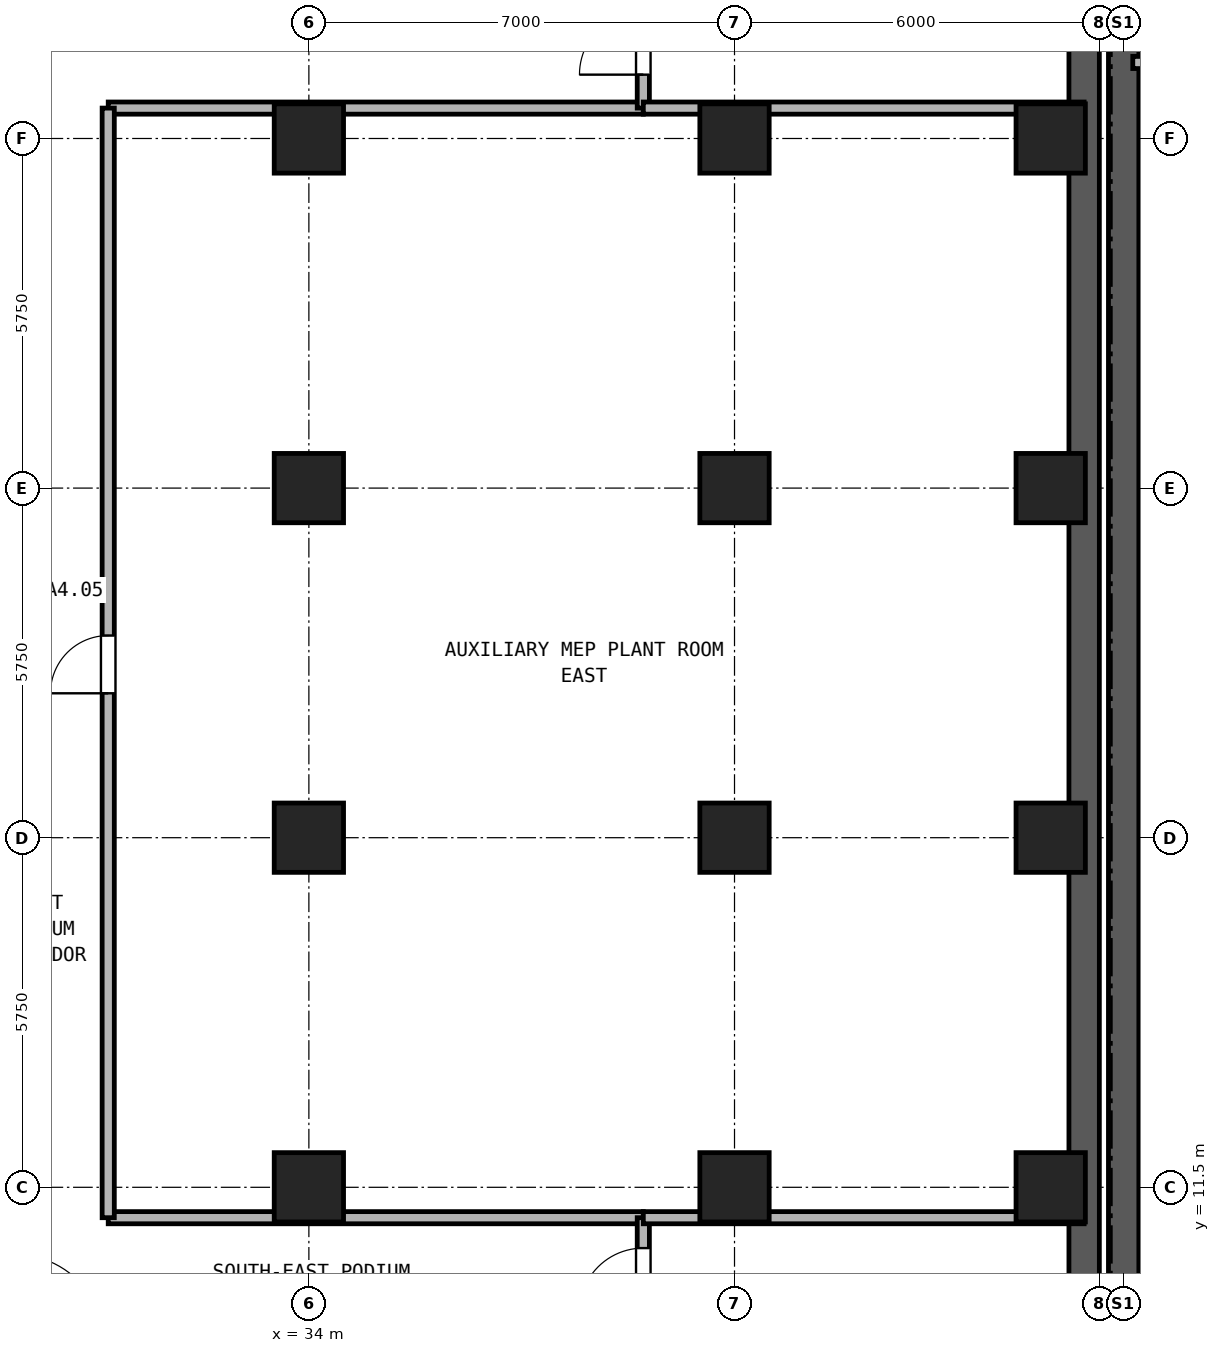
"""IFC4 building model, lengths in metres.
Left out: names, types, materials, properties, quantities, classifications, styles, units other than length and angle.
Written with IfcOpenShell. Run it as: python <this file> out.ifc"""

import sys

from ifc_helpers import new_model, si_unit, direction, frame, frame_2d, origin, origin_2d, place, context, subcontext, project, spatial, rectangle, hollow_rectangle, extrude, source, transform, mapped, element, fill, save


model = new_model("IFC4")
c1 = context("Model", 3, precision=1e-05, world=origin(), true_north=direction((0.0, 1.0)))
c2 = subcontext(c1, "Body", "Model", "MODEL_VIEW")
j1 = project(units=[si_unit("LENGTHUNIT", "METRE"), si_unit("PLANEANGLEUNIT", "RADIAN")], contexts=[c1])
p1 = place(None, origin())
s1 = spatial("IfcSite", under=j1, at=p1, CompositionType="ELEMENT")
p2 = place(p1, origin())
s2 = spatial("IfcBuilding", under=s1, at=p2, CompositionType="ELEMENT")
p3 = place(p2, frame((0.0, 0.0, -4.2)))
s3 = spatial("IfcBuildingStorey", under=s2, at=p3, CompositionType="ELEMENT", Elevation=-4.2)
m1 = source(origin(), c2, "Body", "SweptSolid", [
    extrude(hollow_rectangle(XDim=1.14, YDim=1.14, WallThickness=0.07, at=origin_2d()), origin(), (0.0, 0.0, 1.0), 3.88),
])
for number, where, z_axis, x_axis in (
    (1, (46.2, 11.5, 0.0), (0.0, 0.0, 1.0), (1.0, 0.0, 0.0)),
    (2, (46.2, 17.25, 0.0), (0.0, 0.0, 1.0), (1.0, 0.0, 0.0)),
    (3, (46.2, 23.0, 0.0), (0.0, 0.0, 1.0), (1.0, 0.0, 0.0)),
    (4, (46.2, 28.75, 0.0), (0.0, 0.0, 1.0), (1.0, 0.0, 0.0)),
    (5, (34.0, 11.5, 0.0), (0.0, 0.0, 1.0), (1.0, 0.0, 0.0)),
    (6, (34.0, 17.25, 0.0), (0.0, 0.0, 1.0), (1.0, 0.0, 0.0)),
    (7, (34.0, 23.0, 0.0), (0.0, 0.0, 1.0), (1.0, 0.0, 0.0)),
    (8, (34.0, 28.75, 0.0), (0.0, 0.0, 1.0), (1.0, 0.0, 0.0)),
    (9, (41.0, 11.5, 0.0), (0.0, 0.0, 1.0), (1.0, 0.0, 0.0)),
    (10, (41.0, 17.25, 0.0), (0.0, 0.0, 1.0), (1.0, 0.0, 0.0)),
    (11, (41.0, 23.0, 0.0), (0.0, 0.0, 1.0), (1.0, 0.0, 0.0)),
    (12, (41.0, 28.75, 0.0), (0.0, 0.0, 1.0), (1.0, 0.0, 0.0)),
):
    element("IfcColumn", number, at=place(p3, frame(where, z_axis=z_axis, x_axis=x_axis)), inside=s3, PredefinedType="COLUMN", context=c2, shape_type="MappedRepresentation", body=[
        mapped(m1, transform((0.0, 0.0, 0.0), x_axis=(1.0, 0.0, 0.0), y_axis=(0.0, 1.0, 0.0), z_axis=(0.0, 0.0, 1.0), scale=1.0)),
    ])
p4 = place(p3, frame((46.75, 4.0, 0.0), z_axis=(0.0, 0.0, 1.0), x_axis=(0.0, 1.0, 0.0)))
e13 = element("IfcWall", 13, at=p4, inside=s3, PredefinedType="USERDEFINED", context=c2, shape_type="SweptSolid", body=[
    extrude(rectangle(XDim=32.5, YDim=0.5, at=frame_2d((16.25, 0.0))), origin(), (0.0, 0.0, 1.0), 3.88),
])
p5 = place(p3, frame((47.4, 40.5, 0.0), z_axis=(0.0, 0.0, 1.0), x_axis=(0.0, -1.0, 0.0)))
e14 = element("IfcWall", 14, at=p5, inside=s3, PredefinedType="USERDEFINED", context=c2, shape_type="SweptSolid", body=[
    extrude(rectangle(XDim=40.9, YDim=0.5, at=frame_2d((20.45, 0.0))), origin(), (0.0, 0.0, 1.0), 3.88),
])
for number, where, z_axis, x_axis in (
    (15, (30.7, 11.0, 0.0), (0.0, 0.0, 1.0), (1.0, 0.0, 0.0)),
    (16, (30.7, 29.25, 0.0), (0.0, 0.0, 1.0), (1.0, 0.0, 0.0)),
):
    element("IfcWall", number, at=place(p3, frame(where, z_axis=z_axis, x_axis=x_axis)), inside=s3, PredefinedType="PARTITIONING", context=c2, shape_type="SweptSolid", body=[
        extrude(rectangle(XDim=8.8, YDim=0.2, at=frame_2d((4.4, 0.0))), origin(), (0.0, 0.0, 1.0), 3.88),
    ])
p6 = place(p3, frame((30.7, 11.0, 0.0), z_axis=(0.0, 0.0, 1.0), x_axis=(0.0, 1.0, 0.0)))
e17 = element("IfcWall", 17, at=p6, inside=s3, PredefinedType="PARTITIONING", context=c2, shape_type="SweptSolid", body=[
    extrude(rectangle(XDim=18.25, YDim=0.2, at=frame_2d((9.125, 0.0))), origin(), (0.0, 0.0, 1.0), 3.88),
])
p7 = place(p6, frame((8.625, 0.0, 0.0)))
e18 = element("IfcOpeningElement", 18, at=p7, cuts=e17, PredefinedType="OPENING", context=c2, shape_type="SweptSolid", body=[
    extrude(rectangle(XDim=0.95, YDim=2.15, at=frame_2d((0.475, 1.075))), frame((0.0, 0.11, 0.0), z_axis=(0.0, -1.0, 0.0), x_axis=(1.0, 0.0, 0.0)), (0.0, 0.0, 1.0), 0.22),
])
p8 = place(p3, frame((39.5, 0.25, 0.0), z_axis=(0.0, 0.0, 1.0), x_axis=(0.0, 1.0, 0.0)))
e19 = element("IfcWall", 19, at=p8, inside=s3, PredefinedType="PARTITIONING", context=c2, shape_type="SweptSolid", body=[
    extrude(rectangle(XDim=10.75, YDim=0.2, at=frame_2d((5.375, 0.0))), origin(), (0.0, 0.0, 1.0), 3.88),
])
p9 = place(p8, frame((9.2, 0.0, 0.0)))
e20 = element("IfcOpeningElement", 20, at=p9, cuts=e19, PredefinedType="OPENING", context=c2, shape_type="SweptSolid", body=[
    extrude(rectangle(XDim=1.05, YDim=2.15, at=frame_2d((0.525, 1.075))), frame((0.0, 0.11, 0.0), z_axis=(0.0, -1.0, 0.0), x_axis=(1.0, 0.0, 0.0)), (0.0, 0.0, 1.0), 0.22),
])
p10 = place(p3, frame((39.5, 29.25, 0.0), z_axis=(0.0, 0.0, 1.0), x_axis=(0.0, 1.0, 0.0)))
e21 = element("IfcWall", 21, at=p10, inside=s3, PredefinedType="PARTITIONING", context=c2, shape_type="SweptSolid", body=[
    extrude(rectangle(XDim=11.0, YDim=0.2, at=frame_2d((5.5, 0.0))), origin(), (0.0, 0.0, 1.0), 3.88),
])
p11 = place(p10, frame((0.55, 0.0, 0.0)))
e22 = element("IfcOpeningElement", 22, at=p11, cuts=e21, PredefinedType="OPENING", context=c2, shape_type="SweptSolid", body=[
    extrude(rectangle(XDim=1.05, YDim=2.15, at=frame_2d((0.525, 1.075))), frame((0.0, 0.11, 0.0), z_axis=(0.0, -1.0, 0.0), x_axis=(1.0, 0.0, 0.0)), (0.0, 0.0, 1.0), 0.22),
])
for number, where, z_axis, x_axis in (
    (23, (39.5, 11.0, 0.0), (0.0, 0.0, 1.0), (1.0, 0.0, 0.0)),
    (24, (39.5, 29.25, 0.0), (0.0, 0.0, 1.0), (1.0, 0.0, 0.0)),
):
    element("IfcWall", number, at=place(p3, frame(where, z_axis=z_axis, x_axis=x_axis)), inside=s3, PredefinedType="PARTITIONING", context=c2, shape_type="SweptSolid", body=[
        extrude(rectangle(XDim=7.25, YDim=0.2, at=frame_2d((3.625, 0.0))), origin(), (0.0, 0.0, 1.0), 3.88),
    ])
p12 = place(p3, frame((47.55, 30.0, 0.0), z_axis=(0.0, 0.0, 1.0), x_axis=(1.0, 0.0, 0.0)))
e25 = element("IfcWall", 25, at=p12, inside=s3, PredefinedType="PARTITIONING", context=c2, shape_type="SweptSolid", body=[
    extrude(rectangle(XDim=23.9, YDim=0.2, at=frame_2d((11.95, 0.0))), origin(), (0.0, 0.0, 1.0), 3.88),
])
p13 = place(p12, frame((3.45, 0.0, 0.0)))
e26 = element("IfcOpeningElement", 26, at=p13, cuts=e25, PredefinedType="OPENING", context=c2, shape_type="SweptSolid", body=[
    extrude(rectangle(XDim=1.3, YDim=2.2, at=frame_2d((0.65, 1.1))), frame((0.0, 0.11, 0.0), z_axis=(0.0, -1.0, 0.0), x_axis=(1.0, 0.0, 0.0)), (0.0, 0.0, 1.0), 0.22),
])
p14 = place(p9, origin())
e27 = element("IfcDoor", 27, at=p14, inside=s3, OperationType="SINGLE_SWING_LEFT", PredefinedType="DOOR", context=c2, shape_type="SweptSolid", body=[
    extrude(rectangle(XDim=1.05, YDim=2.15, at=frame_2d((0.525, 1.075))), frame((0.0, 0.025, 0.0), z_axis=(0.0, -1.0, 0.0), x_axis=(1.0, 0.0, 0.0)), (0.0, 0.0, 1.0), 0.05),
])
fill(e20, e27)
p15 = place(p11, origin())
e28 = element("IfcDoor", 28, at=p15, inside=s3, OperationType="SINGLE_SWING_LEFT", PredefinedType="DOOR", context=c2, shape_type="SweptSolid", body=[
    extrude(rectangle(XDim=1.05, YDim=2.15, at=frame_2d((0.525, 1.075))), frame((0.0, 0.025, 0.0), z_axis=(0.0, -1.0, 0.0), x_axis=(1.0, 0.0, 0.0)), (0.0, 0.0, 1.0), 0.05),
])
fill(e22, e28)
p16 = place(p7, origin())
e29 = element("IfcDoor", 29, at=p16, inside=s3, OperationType="SINGLE_SWING_LEFT", PredefinedType="DOOR", context=c2, shape_type="SweptSolid", body=[
    extrude(rectangle(XDim=0.95, YDim=2.15, at=frame_2d((0.475, 1.075))), frame((0.0, 0.025, 0.0), z_axis=(0.0, -1.0, 0.0), x_axis=(1.0, 0.0, 0.0)), (0.0, 0.0, 1.0), 0.05),
])
fill(e18, e29)
save(model, sys.argv[1])
